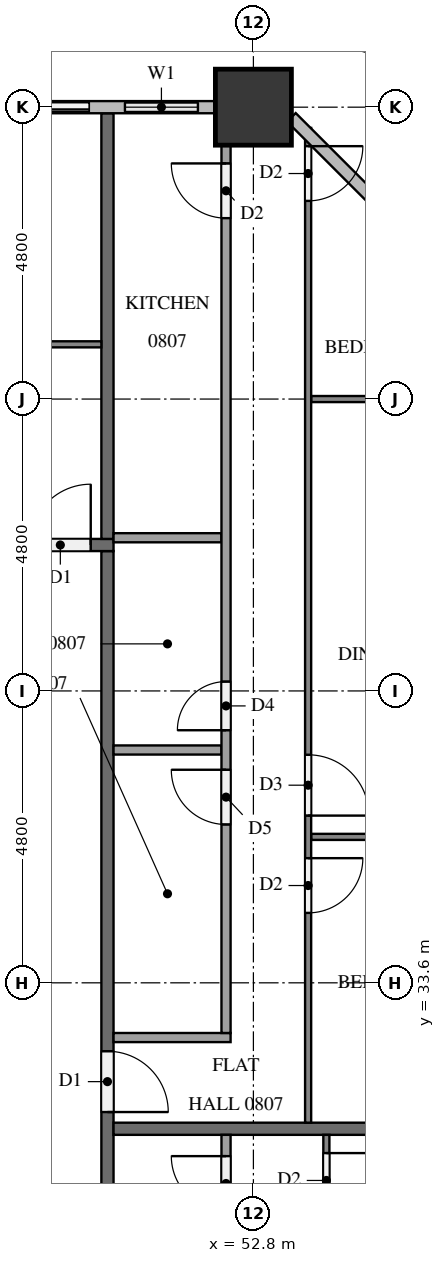
"""IFC4 building model, lengths in metres.
Left out: names, types, materials, properties, quantities, classifications, styles, units other than length and angle.
Written with IfcOpenShell. Run it as: python <this file> out.ifc"""

import sys

from ifc_helpers import new_model, si_unit, direction, frame, frame_2d, origin, origin_2d, place, context, subcontext, project, spatial, rectangle, extrude, element, fill, save


model = new_model("IFC4")
c1 = context("Model", 3, precision=1e-05, world=origin(), true_north=direction((0.0, 1.0)))
c2 = subcontext(c1, "Body", "Model", "MODEL_VIEW")
j1 = project(units=[si_unit("LENGTHUNIT", "METRE"), si_unit("PLANEANGLEUNIT", "RADIAN")], contexts=[c1])
p1 = place(None, origin())
s1 = spatial("IfcSite", under=j1, at=p1, CompositionType="ELEMENT")
p2 = place(p1, origin())
s2 = spatial("IfcBuilding", under=s1, at=p2, CompositionType="ELEMENT")
p3 = place(p2, frame((0.0, 0.0, 36.4)))
s3 = spatial("IfcBuildingStorey", under=s2, at=p3, CompositionType="ELEMENT", Elevation=36.4)
p4 = place(p3, frame((52.8, 48.0, 0.0), z_axis=(0.0, 0.0, 1.0), x_axis=(1.0, 0.0, 0.0)))
e1 = element("IfcColumn", 1, at=p4, inside=s3, PredefinedType="COLUMN", context=c2, shape_type="SweptSolid", body=[
    extrude(rectangle(XDim=1.25, YDim=1.25, at=origin_2d()), origin(), (0.0, 0.0, 1.0), 3.2),
])
p5 = place(p3, frame((52.175, 48.0, 0.0), z_axis=(0.0, 0.0, 1.0), x_axis=(-1.0, 0.0, 0.0)))
e2 = element("IfcWall", 2, at=p5, inside=s3, PredefinedType="SOLIDWALL", context=c2, shape_type="SweptSolid", body=[
    extrude(rectangle(XDim=4.175, YDim=0.15, at=frame_2d((2.087, 0.0))), origin(), (0.0, 0.0, 1.0), 3.2),
])
p6 = place(p5, frame((0.288, 0.0, 0.9)))
e3 = element("IfcOpeningElement", 3, at=p6, cuts=e2, PredefinedType="OPENING", context=c2, shape_type="SweptSolid", body=[
    extrude(rectangle(XDim=1.2, YDim=1.4, at=frame_2d((0.6, 0.7))), frame((0.0, 0.085, 0.0), z_axis=(0.0, -1.0, 0.0), x_axis=(1.0, 0.0, 0.0)), (0.0, 0.0, 1.0), 0.17),
])
p7 = place(p5, frame((2.075, 0.0, 0.0)))
e4 = element("IfcOpeningElement", 4, at=p7, cuts=e2, PredefinedType="OPENING", context=c2, shape_type="SweptSolid", body=[
    extrude(rectangle(XDim=1.8, YDim=2.4, at=frame_2d((0.9, 1.2))), frame((0.0, 0.085, 0.0), z_axis=(0.0, -1.0, 0.0), x_axis=(1.0, 0.0, 0.0)), (0.0, 0.0, 1.0), 0.17),
])
p8 = place(p3, frame((50.4, 40.7, 0.0), z_axis=(0.0, 0.0, 1.0), x_axis=(0.0, -1.0, 0.0)))
e5 = element("IfcWall", 5, at=p8, inside=s3, PredefinedType="PARTITIONING", context=c2, shape_type="SweptSolid", body=[
    extrude(rectangle(XDim=28.6, YDim=0.2, at=frame_2d((14.3, 0.0))), origin(), (0.0, 0.0, 1.0), 3.2),
])
p9 = place(p8, frame((27.375, 0.0, 0.0)))
e6 = element("IfcOpeningElement", 6, at=p9, cuts=e5, PredefinedType="OPENING", context=c2, shape_type="SweptSolid", body=[
    extrude(rectangle(XDim=1.1, YDim=2.1, at=frame_2d((0.55, 1.05))), frame((0.0, 0.11, 0.0), z_axis=(0.0, -1.0, 0.0), x_axis=(1.0, 0.0, 0.0)), (0.0, 0.0, 1.0), 0.22),
])
p10 = place(p8, frame((8.225, 0.0, 0.0)))
e7 = element("IfcOpeningElement", 7, at=p10, cuts=e5, PredefinedType="OPENING", context=c2, shape_type="SweptSolid", body=[
    extrude(rectangle(XDim=1.0, YDim=2.1, at=frame_2d((0.5, 1.05))), frame((0.0, 0.11, 0.0), z_axis=(0.0, -1.0, 0.0), x_axis=(1.0, 0.0, 0.0)), (0.0, 0.0, 1.0), 0.22),
])
p11 = place(p3, frame((11.9, 40.8, 0.0), z_axis=(0.0, 0.0, 1.0), x_axis=(1.0, 0.0, 0.0)))
e8 = element("IfcWall", 8, at=p11, inside=s3, PredefinedType="PARTITIONING", context=c2, shape_type="SweptSolid", body=[
    extrude(rectangle(XDim=38.6, YDim=0.2, at=frame_2d((19.3, 0.0))), origin(), (0.0, 0.0, 1.0), 3.2),
])
p12 = place(p11, frame((37.225, 0.0, 0.0)))
e9 = element("IfcOpeningElement", 9, at=p12, cuts=e8, PredefinedType="OPENING", context=c2, shape_type="SweptSolid", body=[
    extrude(rectangle(XDim=1.0, YDim=2.1, at=frame_2d((0.5, 1.05))), frame((0.0, 0.11, 0.0), z_axis=(0.0, -1.0, 0.0), x_axis=(1.0, 0.0, 0.0)), (0.0, 0.0, 1.0), 0.22),
])
p13 = place(p11, frame((30.025, 0.0, 0.0)))
e10 = element("IfcOpeningElement", 10, at=p13, cuts=e8, PredefinedType="OPENING", context=c2, shape_type="SweptSolid", body=[
    extrude(rectangle(XDim=1.0, YDim=2.1, at=frame_2d((0.5, 1.05))), frame((0.0, 0.11, 0.0), z_axis=(0.0, -1.0, 0.0), x_axis=(1.0, 0.0, 0.0)), (0.0, 0.0, 1.0), 0.22),
])
p14 = place(p11, frame((2.725, 0.0, 0.0)))
e11 = element("IfcOpeningElement", 11, at=p14, cuts=e8, PredefinedType="OPENING", context=c2, shape_type="SweptSolid", body=[
    extrude(rectangle(XDim=1.1, YDim=2.1, at=frame_2d((0.55, 1.05))), frame((0.0, 0.11, 0.0), z_axis=(0.0, -1.0, 0.0), x_axis=(1.0, 0.0, 0.0)), (0.0, 0.0, 1.0), 0.22),
])
p15 = place(p11, frame((1.225, 0.0, 0.0)))
e12 = element("IfcOpeningElement", 12, at=p15, cuts=e8, PredefinedType="OPENING", context=c2, shape_type="SweptSolid", body=[
    extrude(rectangle(XDim=1.0, YDim=2.1, at=frame_2d((0.5, 1.05))), frame((0.0, 0.11, 0.0), z_axis=(0.0, -1.0, 0.0), x_axis=(1.0, 0.0, 0.0)), (0.0, 0.0, 1.0), 0.22),
])
for number, where, z_axis, x_axis in (
    (13, (50.5, 31.2, 0.0), (0.0, 0.0, 1.0), (1.0, 0.0, 0.0)),
    (14, (50.4, 40.9, 0.0), (0.0, 0.0, 1.0), (0.0, 1.0, 0.0)),
):
    element("IfcWall", number, at=place(p3, frame(where, z_axis=z_axis, x_axis=x_axis)), inside=s3, PredefinedType="PARTITIONING", context=c2, shape_type="SweptSolid", body=[
        extrude(rectangle(XDim=7.0, YDim=0.2, at=frame_2d((3.5, 0.0))), origin(), (0.0, 0.0, 1.0), 3.2),
    ])
p16 = place(p3, frame((54.0, 31.1, 0.0), z_axis=(0.0, 0.0, 1.0), x_axis=(0.0, -1.0, 0.0)))
e15 = element("IfcWall", 15, at=p16, inside=s3, PredefinedType="PARTITIONING", context=c2, shape_type="SweptSolid", body=[
    extrude(rectangle(XDim=19.0, YDim=0.1, at=frame_2d((9.5, 0.0))), origin(), (0.0, 0.0, 1.0), 3.2),
])
p17 = place(p16, frame((17.8, 0.0, 0.0)))
e16 = element("IfcOpeningElement", 16, at=p17, cuts=e15, PredefinedType="OPENING", context=c2, shape_type="SweptSolid", body=[
    extrude(rectangle(XDim=0.9, YDim=2.1, at=frame_2d((0.45, 1.05))), frame((0.0, 0.06, 0.0), z_axis=(0.0, -1.0, 0.0), x_axis=(1.0, 0.0, 0.0)), (0.0, 0.0, 1.0), 0.12),
])
p18 = place(p16, frame((9.85, 0.0, 0.0)))
e17 = element("IfcOpeningElement", 17, at=p18, cuts=e15, PredefinedType="OPENING", context=c2, shape_type="SweptSolid", body=[
    extrude(rectangle(XDim=0.9, YDim=2.1, at=frame_2d((0.45, 1.05))), frame((0.0, 0.06, 0.0), z_axis=(0.0, -1.0, 0.0), x_axis=(1.0, 0.0, 0.0)), (0.0, 0.0, 1.0), 0.12),
])
p19 = place(p16, frame((8.15, 0.0, 0.0)))
e18 = element("IfcOpeningElement", 18, at=p19, cuts=e15, PredefinedType="OPENING", context=c2, shape_type="SweptSolid", body=[
    extrude(rectangle(XDim=1.0, YDim=2.1, at=frame_2d((0.5, 1.05))), frame((0.0, 0.06, 0.0), z_axis=(0.0, -1.0, 0.0), x_axis=(1.0, 0.0, 0.0)), (0.0, 0.0, 1.0), 0.12),
])
p20 = place(p16, frame((0.3, 0.0, 0.0)))
e19 = element("IfcOpeningElement", 19, at=p20, cuts=e15, PredefinedType="OPENING", context=c2, shape_type="SweptSolid", body=[
    extrude(rectangle(XDim=0.9, YDim=2.1, at=frame_2d((0.45, 1.05))), frame((0.0, 0.06, 0.0), z_axis=(0.0, -1.0, 0.0), x_axis=(1.0, 0.0, 0.0)), (0.0, 0.0, 1.0), 0.12),
])
p21 = place(p3, frame((52.35, 13.575, 0.0), z_axis=(0.0, 0.0, 1.0), x_axis=(0.0, 1.0, 0.0)))
e20 = element("IfcWall", 20, at=p21, inside=s3, PredefinedType="PARTITIONING", context=c2, shape_type="SweptSolid", body=[
    extrude(rectangle(XDim=17.525, YDim=0.15, at=frame_2d((8.763, 0.0))), origin(), (0.0, 0.0, 1.0), 3.2),
])
p22 = place(p21, frame((0.3, 0.0, 0.0)))
e21 = element("IfcOpeningElement", 21, at=p22, cuts=e20, PredefinedType="OPENING", context=c2, shape_type="SweptSolid", body=[
    extrude(rectangle(XDim=0.9, YDim=2.1, at=frame_2d((0.45, 1.05))), frame((0.0, 0.085, 0.0), z_axis=(0.0, -1.0, 0.0), x_axis=(1.0, 0.0, 0.0)), (0.0, 0.0, 1.0), 0.17),
])
p23 = place(p21, frame((8.733, 0.0, 0.0)))
e22 = element("IfcOpeningElement", 22, at=p23, cuts=e20, PredefinedType="OPENING", context=c2, shape_type="SweptSolid", body=[
    extrude(rectangle(XDim=0.8, YDim=2.1, at=frame_2d((0.4, 1.05))), frame((0.0, 0.085, 0.0), z_axis=(0.0, -1.0, 0.0), x_axis=(1.0, 0.0, 0.0)), (0.0, 0.0, 1.0), 0.17),
])
p24 = place(p21, frame((10.183, 0.0, 0.0)))
e23 = element("IfcOpeningElement", 23, at=p24, cuts=e20, PredefinedType="OPENING", context=c2, shape_type="SweptSolid", body=[
    extrude(rectangle(XDim=0.8, YDim=2.1, at=frame_2d((0.4, 1.05))), frame((0.0, 0.085, 0.0), z_axis=(0.0, -1.0, 0.0), x_axis=(1.0, 0.0, 0.0)), (0.0, 0.0, 1.0), 0.17),
])
p25 = place(p21, frame((16.275, 0.0, 0.0)))
e24 = element("IfcOpeningElement", 24, at=p25, cuts=e20, PredefinedType="OPENING", context=c2, shape_type="SweptSolid", body=[
    extrude(rectangle(XDim=0.9, YDim=2.1, at=frame_2d((0.45, 1.05))), frame((0.0, 0.085, 0.0), z_axis=(0.0, -1.0, 0.0), x_axis=(1.0, 0.0, 0.0)), (0.0, 0.0, 1.0), 0.17),
])
p26 = place(p3, frame((53.75, 36.0, 0.0), z_axis=(0.0, 0.0, 1.0), x_axis=(1.0, 0.0, 0.0)))
e25 = element("IfcWall", 25, at=p26, inside=s3, PredefinedType="PARTITIONING", context=c2, shape_type="SweptSolid", body=[
    extrude(rectangle(XDim=3.75, YDim=0.1, at=frame_2d((1.875, 0.0))), origin(), (0.0, 0.0, 1.0), 3.2),
])
p27 = place(p3, frame((53.75, 43.2, 0.0), z_axis=(0.0, 0.0, 1.0), x_axis=(1.0, 0.0, 0.0)))
e26 = element("IfcWall", 26, at=p27, inside=s3, PredefinedType="PARTITIONING", context=c2, shape_type="SweptSolid", body=[
    extrude(rectangle(XDim=3.225, YDim=0.1, at=frame_2d((1.613, 0.0))), origin(), (0.0, 0.0, 1.0), 3.2),
])
p28 = place(p3, frame((53.7, 47.659, 0.0), z_axis=(0.0, 0.0, 1.0), x_axis=(0.0, -1.0, 0.0)))
e27 = element("IfcWall", 27, at=p28, inside=s3, PredefinedType="PARTITIONING", context=c2, shape_type="SweptSolid", body=[
    extrude(rectangle(XDim=16.359, YDim=0.1, at=frame_2d((8.179, 0.0))), origin(), (0.0, 0.0, 1.0), 3.2),
])
p29 = place(p28, frame((12.009, 0.0, 0.0)))
e28 = element("IfcOpeningElement", 28, at=p29, cuts=e27, PredefinedType="OPENING", context=c2, shape_type="SweptSolid", body=[
    extrude(rectangle(XDim=0.9, YDim=2.1, at=frame_2d((0.45, 1.05))), frame((0.0, 0.06, 0.0), z_axis=(0.0, -1.0, 0.0), x_axis=(1.0, 0.0, 0.0)), (0.0, 0.0, 1.0), 0.12),
])
p30 = place(p28, frame((10.309, 0.0, 0.0)))
e29 = element("IfcOpeningElement", 29, at=p30, cuts=e27, PredefinedType="OPENING", context=c2, shape_type="SweptSolid", body=[
    extrude(rectangle(XDim=1.0, YDim=2.1, at=frame_2d((0.5, 1.05))), frame((0.0, 0.06, 0.0), z_axis=(0.0, -1.0, 0.0), x_axis=(1.0, 0.0, 0.0)), (0.0, 0.0, 1.0), 0.12),
])
p31 = place(p28, frame((0.3, 0.0, 0.0)))
e30 = element("IfcOpeningElement", 30, at=p31, cuts=e27, PredefinedType="OPENING", context=c2, shape_type="SweptSolid", body=[
    extrude(rectangle(XDim=0.9, YDim=2.1, at=frame_2d((0.45, 1.05))), frame((0.0, 0.06, 0.0), z_axis=(0.0, -1.0, 0.0), x_axis=(1.0, 0.0, 0.0)), (0.0, 0.0, 1.0), 0.12),
])
for number, where, z_axis, x_axis in (
    (31, (50.5, 37.429, 0.0), (0.0, 0.0, 1.0), (1.0, 0.0, 0.0)),
    (32, (50.5, 40.919, 0.0), (0.0, 0.0, 1.0), (1.0, 0.0, 0.0)),
):
    element("IfcWall", number, at=place(p3, frame(where, z_axis=z_axis, x_axis=x_axis)), inside=s3, PredefinedType="PARTITIONING", context=c2, shape_type="SweptSolid", body=[
        extrude(rectangle(XDim=1.775, YDim=0.15, at=frame_2d((0.887, 0.0))), origin(), (0.0, 0.0, 1.0), 3.2),
    ])
p32 = place(p3, frame((50.5, 32.7, 0.0), z_axis=(0.0, 0.0, 1.0), x_axis=(1.0, 0.0, 0.0)))
e33 = element("IfcWall", 33, at=p32, inside=s3, PredefinedType="PARTITIONING", context=c2, shape_type="SweptSolid", body=[
    extrude(rectangle(XDim=1.925, YDim=0.15, at=frame_2d((0.962, 0.0))), origin(), (0.0, 0.0, 1.0), 3.2),
])
p33 = place(p3, frame((52.35, 32.775, 0.0), z_axis=(0.0, 0.0, 1.0), x_axis=(0.0, 1.0, 0.0)))
e34 = element("IfcWall", 34, at=p33, inside=s3, PredefinedType="PARTITIONING", context=c2, shape_type="SweptSolid", body=[
    extrude(rectangle(XDim=14.6, YDim=0.15, at=frame_2d((7.3, 0.0))), origin(), (0.0, 0.0, 1.0), 3.2),
])
p34 = place(p33, frame((3.429, 0.0, 0.0)))
e35 = element("IfcOpeningElement", 35, at=p34, cuts=e34, PredefinedType="OPENING", context=c2, shape_type="SweptSolid", body=[
    extrude(rectangle(XDim=0.9, YDim=2.1, at=frame_2d((0.45, 1.05))), frame((0.0, 0.085, 0.0), z_axis=(0.0, -1.0, 0.0), x_axis=(1.0, 0.0, 0.0)), (0.0, 0.0, 1.0), 0.17),
])
p35 = place(p33, frame((4.979, 0.0, 0.0)))
e36 = element("IfcOpeningElement", 36, at=p35, cuts=e34, PredefinedType="OPENING", context=c2, shape_type="SweptSolid", body=[
    extrude(rectangle(XDim=0.8, YDim=2.1, at=frame_2d((0.4, 1.05))), frame((0.0, 0.085, 0.0), z_axis=(0.0, -1.0, 0.0), x_axis=(1.0, 0.0, 0.0)), (0.0, 0.0, 1.0), 0.17),
])
p36 = place(p33, frame((13.4, 0.0, 0.0)))
e37 = element("IfcOpeningElement", 37, at=p36, cuts=e34, PredefinedType="OPENING", context=c2, shape_type="SweptSolid", body=[
    extrude(rectangle(XDim=0.9, YDim=2.1, at=frame_2d((0.45, 1.05))), frame((0.0, 0.085, 0.0), z_axis=(0.0, -1.0, 0.0), x_axis=(1.0, 0.0, 0.0)), (0.0, 0.0, 1.0), 0.17),
])
p37 = place(p3, frame((43.3, 44.1, 0.0), z_axis=(0.0, 0.0, 1.0), x_axis=(1.0, 0.0, 0.0)))
e38 = element("IfcWall", 38, at=p37, inside=s3, PredefinedType="PARTITIONING", context=c2, shape_type="SweptSolid", body=[
    extrude(rectangle(XDim=7.0, YDim=0.1, at=frame_2d((3.5, 0.0))), origin(), (0.0, 0.0, 1.0), 3.2),
])
p38 = place(p37, frame((0.3, 0.0, 0.0)))
e39 = element("IfcOpeningElement", 39, at=p38, cuts=e38, PredefinedType="OPENING", context=c2, shape_type="SweptSolid", body=[
    extrude(rectangle(XDim=1.0, YDim=2.1, at=frame_2d((0.5, 1.05))), frame((0.0, 0.06, 0.0), z_axis=(0.0, -1.0, 0.0), x_axis=(1.0, 0.0, 0.0)), (0.0, 0.0, 1.0), 0.12),
])
p39 = place(p6, origin())
e40 = element("IfcWindow", 40, at=p39, inside=s3, PartitioningType="SINGLE_PANEL", PredefinedType="WINDOW", context=c2, shape_type="SweptSolid", body=[
    extrude(rectangle(XDim=1.2, YDim=1.4, at=frame_2d((0.6, 0.7))), frame((0.0, 0.03, 0.0), z_axis=(0.0, -1.0, 0.0), x_axis=(1.0, 0.0, 0.0)), (0.0, 0.0, 1.0), 0.06),
])
fill(e3, e40)
p40 = place(p7, origin())
e41 = element("IfcDoor", 41, at=p40, inside=s3, OperationType="SLIDING_TO_LEFT", PredefinedType="DOOR", context=c2, shape_type="SweptSolid", body=[
    extrude(rectangle(XDim=1.8, YDim=2.4, at=frame_2d((0.9, 1.2))), frame((0.0, 0.025, 0.0), z_axis=(0.0, -1.0, 0.0), x_axis=(1.0, 0.0, 0.0)), (0.0, 0.0, 1.0), 0.05),
])
fill(e4, e41)
p41 = place(p10, origin())
e42 = element("IfcDoor", 42, at=p41, inside=s3, OperationType="SINGLE_SWING_RIGHT", PredefinedType="DOOR", context=c2, shape_type="SweptSolid", body=[
    extrude(rectangle(XDim=1.0, YDim=2.1, at=frame_2d((0.5, 1.05))), frame((0.0, 0.025, 0.0), z_axis=(0.0, -1.0, 0.0), x_axis=(1.0, 0.0, 0.0)), (0.0, 0.0, 1.0), 0.05),
])
fill(e7, e42)
p42 = place(p12, origin())
e43 = element("IfcDoor", 43, at=p42, inside=s3, OperationType="SINGLE_SWING_RIGHT", PredefinedType="DOOR", context=c2, shape_type="SweptSolid", body=[
    extrude(rectangle(XDim=1.0, YDim=2.1, at=frame_2d((0.5, 1.05))), frame((0.0, 0.025, 0.0), z_axis=(0.0, -1.0, 0.0), x_axis=(1.0, 0.0, 0.0)), (0.0, 0.0, 1.0), 0.05),
])
fill(e9, e43)
p43 = place(p20, origin())
e44 = element("IfcDoor", 44, at=p43, inside=s3, OperationType="SINGLE_SWING_LEFT", PredefinedType="DOOR", context=c2, shape_type="SweptSolid", body=[
    extrude(rectangle(XDim=0.9, YDim=2.1, at=frame_2d((0.45, 1.05))), frame((0.0, 0.025, 0.0), z_axis=(0.0, -1.0, 0.0), x_axis=(1.0, 0.0, 0.0)), (0.0, 0.0, 1.0), 0.05),
])
fill(e19, e44)
p44 = place(p25, origin())
e45 = element("IfcDoor", 45, at=p44, inside=s3, OperationType="SINGLE_SWING_RIGHT", PredefinedType="DOOR", context=c2, shape_type="SweptSolid", body=[
    extrude(rectangle(XDim=0.9, YDim=2.1, at=frame_2d((0.45, 1.05))), frame((0.0, 0.025, 0.0), z_axis=(0.0, -1.0, 0.0), x_axis=(1.0, 0.0, 0.0)), (0.0, 0.0, 1.0), 0.05),
])
fill(e24, e45)
p45 = place(p29, origin())
e46 = element("IfcDoor", 46, at=p45, inside=s3, OperationType="SINGLE_SWING_LEFT", PredefinedType="DOOR", context=c2, shape_type="SweptSolid", body=[
    extrude(rectangle(XDim=0.9, YDim=2.1, at=frame_2d((0.45, 1.05))), frame((0.0, 0.025, 0.0), z_axis=(0.0, -1.0, 0.0), x_axis=(1.0, 0.0, 0.0)), (0.0, 0.0, 1.0), 0.05),
])
fill(e28, e46)
p46 = place(p30, origin())
e47 = element("IfcDoor", 47, at=p46, inside=s3, OperationType="SINGLE_SWING_RIGHT", PredefinedType="DOOR", context=c2, shape_type="SweptSolid", body=[
    extrude(rectangle(XDim=1.0, YDim=2.1, at=frame_2d((0.5, 1.05))), frame((0.0, 0.025, 0.0), z_axis=(0.0, -1.0, 0.0), x_axis=(1.0, 0.0, 0.0)), (0.0, 0.0, 1.0), 0.05),
])
fill(e29, e47)
p47 = place(p31, origin())
e48 = element("IfcDoor", 48, at=p47, inside=s3, OperationType="SINGLE_SWING_LEFT", PredefinedType="DOOR", context=c2, shape_type="SweptSolid", body=[
    extrude(rectangle(XDim=0.9, YDim=2.1, at=frame_2d((0.45, 1.05))), frame((0.0, 0.025, 0.0), z_axis=(0.0, -1.0, 0.0), x_axis=(1.0, 0.0, 0.0)), (0.0, 0.0, 1.0), 0.05),
])
fill(e30, e48)
p48 = place(p34, origin())
e49 = element("IfcDoor", 49, at=p48, inside=s3, OperationType="SINGLE_SWING_RIGHT", PredefinedType="DOOR", context=c2, shape_type="SweptSolid", body=[
    extrude(rectangle(XDim=0.9, YDim=2.1, at=frame_2d((0.45, 1.05))), frame((0.0, 0.025, 0.0), z_axis=(0.0, -1.0, 0.0), x_axis=(1.0, 0.0, 0.0)), (0.0, 0.0, 1.0), 0.05),
])
fill(e35, e49)
p49 = place(p35, origin())
e50 = element("IfcDoor", 50, at=p49, inside=s3, OperationType="SINGLE_SWING_LEFT", PredefinedType="DOOR", context=c2, shape_type="SweptSolid", body=[
    extrude(rectangle(XDim=0.8, YDim=2.1, at=frame_2d((0.4, 1.05))), frame((0.0, 0.025, 0.0), z_axis=(0.0, -1.0, 0.0), x_axis=(1.0, 0.0, 0.0)), (0.0, 0.0, 1.0), 0.05),
])
fill(e36, e50)
p50 = place(p36, origin())
e51 = element("IfcDoor", 51, at=p50, inside=s3, OperationType="SINGLE_SWING_RIGHT", PredefinedType="DOOR", context=c2, shape_type="SweptSolid", body=[
    extrude(rectangle(XDim=0.9, YDim=2.1, at=frame_2d((0.45, 1.05))), frame((0.0, 0.025, 0.0), z_axis=(0.0, -1.0, 0.0), x_axis=(1.0, 0.0, 0.0)), (0.0, 0.0, 1.0), 0.05),
])
fill(e37, e51)
save(model, sys.argv[1])
